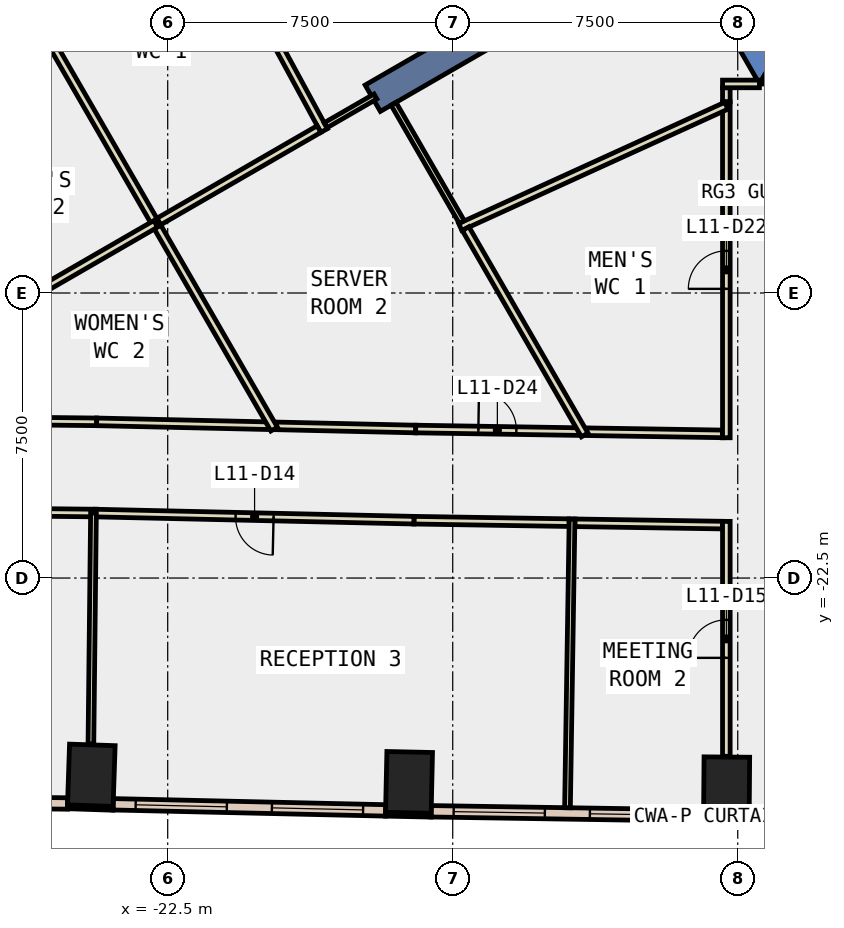
"""IFC4 building model, lengths in metres.
Left out: names, types, materials, properties, quantities, classifications, styles, units other than length and angle.
Written with IfcOpenShell. Run it as: python <this file> out.ifc"""

import sys

from ifc_helpers import new_model, si_unit, direction, frame, frame_2d, origin, origin_2d, place, context, subcontext, project, spatial, polyline, rectangle, outline, extrude, element, fill, save


model = new_model("IFC4")
c1 = context("Model", 3, precision=1e-05, world=origin(), true_north=direction((0.0, 1.0)))
c2 = subcontext(c1, "Body", "Model", "MODEL_VIEW")
j1 = project(units=[si_unit("LENGTHUNIT", "METRE"), si_unit("PLANEANGLEUNIT", "RADIAN")], contexts=[c1])
p1 = place(None, origin())
s1 = spatial("IfcSite", under=j1, at=p1, CompositionType="ELEMENT")
p2 = place(p1, origin())
s2 = spatial("IfcBuilding", under=s1, at=p2, CompositionType="ELEMENT")
p3 = place(p2, frame((0.0, 0.0, 56.0)))
s3 = spatial("IfcBuildingStorey", under=s2, at=p3, CompositionType="ELEMENT", Elevation=56.0)
for number, where, z_axis, x_axis in (
    (1, (-24.51, -27.69, -0.4), (0.0, 0.0, 1.0), (-0.999, 0.034, 0.0)),
    (2, (-16.15, -27.877, -0.4), (0.0, 0.0, 1.0), (-1.0, 0.022, 0.0)),
    (3, (-7.793, -28.01, -0.4), (0.0, 0.0, 1.0), (-1.0, 0.008, 0.0)),
):
    element("IfcColumn", number, at=place(p3, frame(where, z_axis=z_axis, x_axis=x_axis)), inside=s3, PredefinedType="COLUMN", context=c2, shape_type="SweptSolid", body=[
        extrude(rectangle(XDim=1.2, YDim=1.6, at=origin_2d()), origin(), (0.0, 0.0, 1.0), 4.2),
    ])
p4 = place(p3, frame((0.0, 0.0, -0.4)))
e4 = element("IfcWall", 4, at=p4, inside=s3, PredefinedType="SHEAR", context=c2, shape_type="SweptSolid", body=[
    extrude(outline(polyline([(-13.856, 2.5), (-6.928, -9.5), (-6.351, -8.5), (-12.702, 2.5), (-13.856, 2.5)])), origin(), (0.0, 0.0, 1.0), 4.2),
])
p5 = place(p3, frame((0.0, 0.0, -0.4)))
e5 = element("IfcWall", 5, at=p5, inside=s3, PredefinedType="SHEAR", context=c2, shape_type="SweptSolid", body=[
    extrude(outline(polyline([(3.75, -9.5), (3.75, -8.5), (-6.351, -8.5), (-6.928, -9.5), (3.75, -9.5)])), origin(), (0.0, 0.0, 1.0), 4.2),
])
p6 = place(p3, frame((-9.31, -5.375, -0.4), z_axis=(0.0, 0.0, 1.0), x_axis=(-0.866017533419, -0.500013631625, 0.0)))
e6 = element("IfcWall", 6, at=p6, inside=s3, PredefinedType="SHEAR", context=c2, shape_type="SweptSolid", body=[
    extrude(rectangle(XDim=9.0, YDim=0.8, at=frame_2d((4.5, 0.0))), origin(), (0.0, 0.0, 1.0), 4.2),
])
p7 = place(p3, frame((-25.138, -28.519, 0.0), z_axis=(0.0, 0.0, 1.0), x_axis=(0.999442872267, -0.03337581573, 0.0)))
e7 = element("IfcWall", 7, at=p7, inside=s3, PredefinedType="STANDARD", context=c2, shape_type="SweptSolid", body=[
    extrude(rectangle(XDim=1.2, YDim=0.1, at=frame_2d((0.6, 0.0))), origin(), (0.0, 0.0, 1.0), 3.8),
])
p8 = place(p3, frame((-16.769, -28.714, 0.0), z_axis=(0.0, 0.0, 1.0), x_axis=(0.99976752127, -0.021561618973, 0.0)))
e8 = element("IfcWall", 8, at=p8, inside=s3, PredefinedType="STANDARD", context=c2, shape_type="SweptSolid", body=[
    extrude(rectangle(XDim=1.2, YDim=0.1, at=frame_2d((0.6, 0.0))), origin(), (0.0, 0.0, 1.0), 3.8),
])
p9 = place(p3, frame((-8.4, -28.855, 0.0), z_axis=(0.0, 0.0, 1.0), x_axis=(0.999965208912, -0.008341520563, 0.0)))
e9 = element("IfcWall", 9, at=p9, inside=s3, PredefinedType="STANDARD", context=c2, shape_type="SweptSolid", body=[
    extrude(rectangle(XDim=1.2, YDim=0.1, at=frame_2d((0.6, 0.0))), origin(), (0.0, 0.0, 1.0), 3.8),
])
p10 = place(p3, frame((-32.279, -28.353, 0.0), z_axis=(0.0, 0.0, 1.0), x_axis=(0.999939101213, -0.011036025753, 0.0)))
e10 = element("IfcWall", 10, at=p10, inside=s3, PredefinedType="STANDARD", context=c2, shape_type="SweptSolid", body=[
    extrude(rectangle(XDim=7.146, YDim=0.3, at=frame_2d((3.573, 0.0))), origin(), (0.0, 0.0, 1.0), 3.8),
])
p11 = place(p10, frame((0.586, 0.0, 0.9)))
e11 = element("IfcOpeningElement", 11, at=p11, cuts=e10, PredefinedType="OPENING", context=c2, shape_type="SweptSolid", body=[
    extrude(rectangle(XDim=2.4, YDim=2.6, at=frame_2d((1.2, 1.3))), frame((0.0, 0.16, 0.0), z_axis=(0.0, -1.0, 0.0), x_axis=(1.0, 0.0, 0.0)), (0.0, 0.0, 1.0), 0.32),
])
p12 = place(p10, frame((4.159, 0.0, 0.9)))
e12 = element("IfcOpeningElement", 12, at=p12, cuts=e10, PredefinedType="OPENING", context=c2, shape_type="SweptSolid", body=[
    extrude(rectangle(XDim=2.4, YDim=2.6, at=frame_2d((1.2, 1.3))), frame((0.0, 0.16, 0.0), z_axis=(0.0, -1.0, 0.0), x_axis=(1.0, 0.0, 0.0)), (0.0, 0.0, 1.0), 0.32),
])
p13 = place(p3, frame((-23.936, -28.453, 0.0), z_axis=(0.0, 0.0, 1.0), x_axis=(0.999747567852, -0.022467767461, 0.0)))
e13 = element("IfcWall", 13, at=p13, inside=s3, PredefinedType="STANDARD", context=c2, shape_type="SweptSolid", body=[
    extrude(rectangle(XDim=7.172, YDim=0.3, at=frame_2d((3.586, 0.0))), origin(), (0.0, 0.0, 1.0), 3.8),
])
p14 = place(p13, frame((0.593, 0.0, 0.9)))
e14 = element("IfcOpeningElement", 14, at=p14, cuts=e13, PredefinedType="OPENING", context=c2, shape_type="SweptSolid", body=[
    extrude(rectangle(XDim=2.4, YDim=2.6, at=frame_2d((1.2, 1.3))), frame((0.0, 0.16, 0.0), z_axis=(0.0, -1.0, 0.0), x_axis=(1.0, 0.0, 0.0)), (0.0, 0.0, 1.0), 0.32),
])
p15 = place(p13, frame((4.179, 0.0, 0.9)))
e15 = element("IfcOpeningElement", 15, at=p15, cuts=e13, PredefinedType="OPENING", context=c2, shape_type="SweptSolid", body=[
    extrude(rectangle(XDim=2.4, YDim=2.6, at=frame_2d((1.2, 1.3))), frame((0.0, 0.16, 0.0), z_axis=(0.0, -1.0, 0.0), x_axis=(1.0, 0.0, 0.0)), (0.0, 0.0, 1.0), 0.32),
])
p16 = place(p3, frame((-15.568, -28.637, 0.0), z_axis=(0.0, 0.0, 1.0), x_axis=(0.999875756772, -0.015762963512, 0.0)))
e16 = element("IfcWall", 16, at=p16, inside=s3, PredefinedType="STANDARD", context=c2, shape_type="SweptSolid", body=[
    extrude(rectangle(XDim=7.171, YDim=0.3, at=frame_2d((3.585, 0.0))), origin(), (0.0, 0.0, 1.0), 3.8),
])
p17 = place(p16, frame((0.593, 0.0, 0.9)))
e17 = element("IfcOpeningElement", 17, at=p17, cuts=e16, PredefinedType="OPENING", context=c2, shape_type="SweptSolid", body=[
    extrude(rectangle(XDim=2.4, YDim=2.6, at=frame_2d((1.2, 1.3))), frame((0.0, 0.16, 0.0), z_axis=(0.0, -1.0, 0.0), x_axis=(1.0, 0.0, 0.0)), (0.0, 0.0, 1.0), 0.32),
])
p18 = place(p16, frame((4.178, 0.0, 0.9)))
e18 = element("IfcOpeningElement", 18, at=p18, cuts=e16, PredefinedType="OPENING", context=c2, shape_type="SweptSolid", body=[
    extrude(rectangle(XDim=2.4, YDim=2.6, at=frame_2d((1.2, 1.3))), frame((0.0, 0.16, 0.0), z_axis=(0.0, -1.0, 0.0), x_axis=(1.0, 0.0, 0.0)), (0.0, 0.0, 1.0), 0.32),
])
p19 = place(p3, frame((-11.477, -18.65, 0.0), z_axis=(0.0, 0.0, 1.0), x_axis=(0.9998724957, -0.015968479661, 0.0)))
e19 = element("IfcWall", 19, at=p19, inside=s3, PredefinedType="PARTITIONING", context=c2, shape_type="SweptSolid", body=[
    extrude(rectangle(XDim=3.578, YDim=0.2, at=frame_2d((1.789, 0.0))), origin(), (0.0, 0.0, 1.0), 3.8),
])
p20 = place(p3, frame((-19.649, -18.496, 0.0), z_axis=(0.0, 0.0, 1.0), x_axis=(0.999744980574, -0.02258259988, 0.0)))
e20 = element("IfcWall", 20, at=p20, inside=s3, PredefinedType="PARTITIONING", context=c2, shape_type="SweptSolid", body=[
    extrude(rectangle(XDim=3.676, YDim=0.2, at=frame_2d((1.838, 0.0))), origin(), (0.0, 0.0, 1.0), 3.8),
])
p21 = place(p3, frame((-15.974, -18.579, 0.0), z_axis=(0.0, 0.0, 1.0), x_axis=(0.999875289316, -0.015792587377, 0.0)))
e21 = element("IfcWall", 21, at=p21, inside=s3, PredefinedType="PARTITIONING", context=c2, shape_type="SweptSolid", body=[
    extrude(rectangle(XDim=4.298, YDim=0.2, at=frame_2d((2.149, 0.0))), origin(), (0.0, 0.0, 1.0), 3.8),
])
p22 = place(p21, frame((1.649, 0.0, 0.0)))
e22 = element("IfcOpeningElement", 22, at=p22, cuts=e21, PredefinedType="OPENING", context=c2, shape_type="SweptSolid", body=[
    extrude(rectangle(XDim=1.0, YDim=2.1, at=frame_2d((0.5, 1.05))), frame((0.0, 0.11, 0.0), z_axis=(0.0, -1.0, 0.0), x_axis=(1.0, 0.0, 0.0)), (0.0, 0.0, 1.0), 0.22),
])
p23 = place(p3, frame((-31.431, -18.312, 0.0), z_axis=(0.0, 0.0, 1.0), x_axis=(0.999939195602, -0.011027470214, 0.0)))
e23 = element("IfcWall", 23, at=p23, inside=s3, PredefinedType="PARTITIONING", context=c2, shape_type="SweptSolid", body=[
    extrude(rectangle(XDim=7.062, YDim=0.2, at=frame_2d((3.531, 0.0))), origin(), (0.0, 0.0, 1.0), 3.8),
])
p24 = place(p23, frame((3.031, 0.0, 0.0)))
e24 = element("IfcOpeningElement", 24, at=p24, cuts=e23, PredefinedType="OPENING", context=c2, shape_type="SweptSolid", body=[
    extrude(rectangle(XDim=1.0, YDim=2.1, at=frame_2d((0.5, 1.05))), frame((0.0, 0.11, 0.0), z_axis=(0.0, -1.0, 0.0), x_axis=(1.0, 0.0, 0.0)), (0.0, 0.0, 1.0), 0.22),
])
p25 = place(p3, frame((-24.369, -18.39, 0.0), z_axis=(0.0, 0.0, 1.0), x_axis=(0.99974519793, -0.022572975354, 0.0)))
e25 = element("IfcWall", 25, at=p25, inside=s3, PredefinedType="PARTITIONING", context=c2, shape_type="SweptSolid", body=[
    extrude(rectangle(XDim=4.521, YDim=0.2, at=frame_2d((2.26, 0.0))), origin(), (0.0, 0.0, 1.0), 3.8),
])
p26 = place(p3, frame((-24.378, -20.79, 0.0), z_axis=(0.0, 0.0, 1.0), x_axis=(-0.99993897746, 0.011047232974, 0.0)))
e26 = element("IfcWall", 26, at=p26, inside=s3, PredefinedType="PARTITIONING", context=c2, shape_type="SweptSolid", body=[
    extrude(rectangle(XDim=7.426, YDim=0.2, at=frame_2d((3.713, 0.0))), origin(), (0.0, 0.0, 1.0), 3.8),
])
p27 = place(p3, frame((-11.936, -21.043, 0.0), z_axis=(0.0, 0.0, 1.0), x_axis=(-0.999873595398, 0.015899472524, 0.0)))
e27 = element("IfcWall", 27, at=p27, inside=s3, PredefinedType="PARTITIONING", context=c2, shape_type="SweptSolid", body=[
    extrude(rectangle(XDim=4.084, YDim=0.2, at=frame_2d((2.042, 0.0))), origin(), (0.0, 0.0, 1.0), 3.8),
])
p28 = place(p3, frame((-16.02, -20.978, 0.0), z_axis=(0.0, 0.0, 1.0), x_axis=(-0.999749010047, 0.02240350216, 0.0)))
e28 = element("IfcWall", 28, at=p28, inside=s3, PredefinedType="PARTITIONING", context=c2, shape_type="SweptSolid", body=[
    extrude(rectangle(XDim=8.391, YDim=0.2, at=frame_2d((4.196, 0.0))), origin(), (0.0, 0.0, 1.0), 3.8),
])
p29 = place(p28, frame((3.695, 0.0, 0.0)))
e29 = element("IfcOpeningElement", 29, at=p29, cuts=e28, PredefinedType="OPENING", context=c2, shape_type="SweptSolid", body=[
    extrude(rectangle(XDim=1.0, YDim=2.1, at=frame_2d((0.5, 1.05))), frame((0.0, 0.11, 0.0), z_axis=(0.0, -1.0, 0.0), x_axis=(1.0, 0.0, 0.0)), (0.0, 0.0, 1.0), 0.22),
])
p30 = place(p3, frame((-7.9, -21.107, 0.0), z_axis=(0.0, 0.0, 1.0), x_axis=(-0.999876676102, 0.015704540367, 0.0)))
e30 = element("IfcWall", 30, at=p30, inside=s3, PredefinedType="PARTITIONING", context=c2, shape_type="SweptSolid", body=[
    extrude(rectangle(XDim=3.886, YDim=0.2, at=frame_2d((1.943, 0.0))), origin(), (0.0, 0.0, 1.0), 3.8),
])
p31 = place(p3, frame((-7.8, -9.972, 0.0), z_axis=(0.0, 0.0, 1.0), x_axis=(0.0, 1.0, 0.0)))
e31 = element("IfcWall", 31, at=p31, inside=s3, PredefinedType="PARTITIONING", context=c2, shape_type="SweptSolid", body=[
    extrude(rectangle(XDim=0.373, YDim=0.2, at=frame_2d((0.187, 0.0))), origin(), (0.0, 0.0, 1.0), 3.8),
])
p32 = place(p3, frame((-7.9, -9.499, 0.0), z_axis=(0.0, 0.0, 1.0), x_axis=(1.0, 0.0, 0.0)))
e32 = element("IfcWall", 32, at=p32, inside=s3, PredefinedType="PARTITIONING", context=c2, shape_type="SweptSolid", body=[
    extrude(rectangle(XDim=0.971, YDim=0.2, at=frame_2d((0.485, 0.0))), origin(), (0.0, 0.0, 1.0), 3.8),
])
p33 = place(p3, frame((-7.8, -18.809, 0.0), z_axis=(0.0, 0.0, 1.0), x_axis=(0.0, 1.0, 0.0)))
e33 = element("IfcWall", 33, at=p33, inside=s3, PredefinedType="PARTITIONING", context=c2, shape_type="SweptSolid", body=[
    extrude(rectangle(XDim=8.837, YDim=0.2, at=frame_2d((4.418, 0.0))), origin(), (0.0, 0.0, 1.0), 3.8),
])
p34 = place(p33, frame((3.918, 0.0, 0.0)))
e34 = element("IfcOpeningElement", 34, at=p34, cuts=e33, PredefinedType="OPENING", context=c2, shape_type="SweptSolid", body=[
    extrude(rectangle(XDim=1.0, YDim=2.1, at=frame_2d((0.5, 1.05))), frame((0.0, 0.11, 0.0), z_axis=(0.0, -1.0, 0.0), x_axis=(1.0, 0.0, 0.0)), (0.0, 0.0, 1.0), 0.22),
])
p35 = place(p3, frame((-7.8, -27.19, 0.0), z_axis=(0.0, 0.0, 1.0), x_axis=(0.0, 1.0, 0.0)))
e35 = element("IfcWall", 35, at=p35, inside=s3, PredefinedType="PARTITIONING", context=c2, shape_type="SweptSolid", body=[
    extrude(rectangle(XDim=6.181, YDim=0.2, at=frame_2d((3.09, 0.0))), origin(), (0.0, 0.0, 1.0), 3.8),
])
p36 = place(p35, frame((2.59, 0.0, 0.0)))
e36 = element("IfcOpeningElement", 36, at=p36, cuts=e35, PredefinedType="OPENING", context=c2, shape_type="SweptSolid", body=[
    extrude(rectangle(XDim=1.0, YDim=2.1, at=frame_2d((0.5, 1.05))), frame((0.0, 0.11, 0.0), z_axis=(0.0, -1.0, 0.0), x_axis=(1.0, 0.0, 0.0)), (0.0, 0.0, 1.0), 0.22),
])
p37 = place(p3, frame((-7.8, -10.072, 0.0), z_axis=(0.0, 0.0, 1.0), x_axis=(-0.910011899741, -0.414582129777, 0.0)))
e37 = element("IfcWall", 37, at=p37, inside=s3, PredefinedType="PARTITIONING", context=c2, shape_type="SweptSolid", body=[
    extrude(rectangle(XDim=7.694, YDim=0.2, at=frame_2d((3.847, 0.0))), origin(), (0.0, 0.0, 1.0), 3.8),
])
p38 = place(p3, frame((-18.384, -10.725, 0.0), z_axis=(0.0, 0.0, 1.0), x_axis=(-0.477137547132, 0.878828630119, 0.0)))
e38 = element("IfcWall", 38, at=p38, inside=s3, PredefinedType="PARTITIONING", context=c2, shape_type="SweptSolid", body=[
    extrude(rectangle(XDim=9.552, YDim=0.2, at=frame_2d((4.776, 0.0))), origin(), (0.0, 0.0, 1.0), 3.8),
])
p39 = place(p3, frame((-14.761, -13.134, 0.0), z_axis=(0.0, 0.0, 1.0), x_axis=(-0.499704810774, 0.866195764299, 0.0)))
e39 = element("IfcWall", 39, at=p39, inside=s3, PredefinedType="PARTITIONING", context=c2, shape_type="SweptSolid", body=[
    extrude(rectangle(XDim=3.594, YDim=0.15, at=frame_2d((1.797, 0.0))), origin(), (0.0, 0.0, 1.0), 3.8),
])
p40 = place(p3, frame((-17.033, -9.829, 0.0), z_axis=(0.0, 0.0, 1.0), x_axis=(-0.866094414679, -0.49988045057, 0.0)))
e40 = element("IfcWall", 40, at=p40, inside=s3, PredefinedType="PARTITIONING", context=c2, shape_type="SweptSolid", body=[
    extrude(rectangle(XDim=1.516, YDim=0.15, at=frame_2d((0.758, 0.0))), origin(), (0.0, 0.0, 1.0), 3.8),
])
p41 = place(p3, frame((-11.527, -18.735, 0.0), z_axis=(0.0, 0.0, 1.0), x_axis=(-0.499976457224, 0.866038995786, 0.0)))
e41 = element("IfcWall", 41, at=p41, inside=s3, PredefinedType="PARTITIONING", context=c2, shape_type="SweptSolid", body=[
    extrude(rectangle(XDim=6.268, YDim=0.2, at=frame_2d((3.134, 0.0))), origin(), (0.0, 0.0, 1.0), 3.8),
])
p42 = place(p3, frame((-18.519, -10.687, 0.0), z_axis=(0.0, 0.0, 1.0), x_axis=(-0.866063668779, -0.499933717229, 0.0)))
e42 = element("IfcWall", 42, at=p42, inside=s3, PredefinedType="PARTITIONING", context=c2, shape_type="SweptSolid", body=[
    extrude(rectangle(XDim=4.969, YDim=0.2, at=frame_2d((2.484, 0.0))), origin(), (0.0, 0.0, 1.0), 3.8),
])
p43 = place(p3, frame((-22.822, -13.171, 0.0), z_axis=(0.0, 0.0, 1.0), x_axis=(-0.499974913987, 0.866039886717, 0.0)))
e43 = element("IfcWall", 43, at=p43, inside=s3, PredefinedType="PARTITIONING", context=c2, shape_type="SweptSolid", body=[
    extrude(rectangle(XDim=6.222, YDim=0.2, at=frame_2d((3.111, 0.0))), origin(), (0.0, 0.0, 1.0), 3.8),
])
p44 = place(p3, frame((-19.699, -18.581, 0.0), z_axis=(0.0, 0.0, 1.0), x_axis=(-0.499899838407, 0.866083224385, 0.0)))
e44 = element("IfcWall", 44, at=p44, inside=s3, PredefinedType="PARTITIONING", context=c2, shape_type="SweptSolid", body=[
    extrude(rectangle(XDim=6.235, YDim=0.2, at=frame_2d((3.118, 0.0))), origin(), (0.0, 0.0, 1.0), 3.8),
])
p45 = place(p3, frame((-22.816, -13.181, 0.0), z_axis=(0.0, 0.0, 1.0), x_axis=(-0.86601529143, -0.500017514703, 0.0)))
e45 = element("IfcWall", 45, at=p45, inside=s3, PredefinedType="PARTITIONING", context=c2, shape_type="SweptSolid", body=[
    extrude(rectangle(XDim=9.932, YDim=0.2, at=frame_2d((4.966, 0.0))), origin(), (0.0, 0.0, 1.0), 3.8),
])
p46 = place(p3, frame((-24.453, -20.79, 0.0), z_axis=(0.0, 0.0, 1.0), x_axis=(-0.011204565898, -0.999937226881, 0.0)))
e46 = element("IfcWall", 46, at=p46, inside=s3, PredefinedType="PARTITIONING", context=c2, shape_type="SweptSolid", body=[
    extrude(rectangle(XDim=6.079, YDim=0.15, at=frame_2d((3.04, 0.0))), origin(), (0.0, 0.0, 1.0), 3.8),
])
p47 = place(p3, frame((-11.86, -20.945, 0.0), z_axis=(0.0, 0.0, 1.0), x_axis=(-0.015773137921, -0.999875596322, 0.0)))
e47 = element("IfcWall", 47, at=p47, inside=s3, PredefinedType="PARTITIONING", context=c2, shape_type="SweptSolid", body=[
    extrude(rectangle(XDim=7.6, YDim=0.15, at=frame_2d((3.8, 0.0))), origin(), (0.0, 0.0, 1.0), 3.8),
])
p48 = place(p14, origin())
e48 = element("IfcWindow", 48, at=p48, inside=s3, PartitioningType="SINGLE_PANEL", PredefinedType="WINDOW", context=c2, shape_type="SweptSolid", body=[
    extrude(rectangle(XDim=2.4, YDim=2.6, at=frame_2d((1.2, 1.3))), frame((0.0, 0.03, 0.0), z_axis=(0.0, -1.0, 0.0), x_axis=(1.0, 0.0, 0.0)), (0.0, 0.0, 1.0), 0.06),
])
fill(e14, e48)
p49 = place(p15, origin())
e49 = element("IfcWindow", 49, at=p49, inside=s3, PartitioningType="SINGLE_PANEL", PredefinedType="WINDOW", context=c2, shape_type="SweptSolid", body=[
    extrude(rectangle(XDim=2.4, YDim=2.6, at=frame_2d((1.2, 1.3))), frame((0.0, 0.03, 0.0), z_axis=(0.0, -1.0, 0.0), x_axis=(1.0, 0.0, 0.0)), (0.0, 0.0, 1.0), 0.06),
])
fill(e15, e49)
p50 = place(p17, origin())
e50 = element("IfcWindow", 50, at=p50, inside=s3, PartitioningType="SINGLE_PANEL", PredefinedType="WINDOW", context=c2, shape_type="SweptSolid", body=[
    extrude(rectangle(XDim=2.4, YDim=2.6, at=frame_2d((1.2, 1.3))), frame((0.0, 0.03, 0.0), z_axis=(0.0, -1.0, 0.0), x_axis=(1.0, 0.0, 0.0)), (0.0, 0.0, 1.0), 0.06),
])
fill(e17, e50)
p51 = place(p18, origin())
e51 = element("IfcWindow", 51, at=p51, inside=s3, PartitioningType="SINGLE_PANEL", PredefinedType="WINDOW", context=c2, shape_type="SweptSolid", body=[
    extrude(rectangle(XDim=2.4, YDim=2.6, at=frame_2d((1.2, 1.3))), frame((0.0, 0.03, 0.0), z_axis=(0.0, -1.0, 0.0), x_axis=(1.0, 0.0, 0.0)), (0.0, 0.0, 1.0), 0.06),
])
fill(e18, e51)
p52 = place(p29, origin())
e52 = element("IfcDoor", 52, at=p52, inside=s3, OperationType="SINGLE_SWING_RIGHT", PredefinedType="DOOR", context=c2, shape_type="SweptSolid", body=[
    extrude(rectangle(XDim=1.0, YDim=2.1, at=frame_2d((0.5, 1.05))), frame((0.0, 0.025, 0.0), z_axis=(0.0, -1.0, 0.0), x_axis=(1.0, 0.0, 0.0)), (0.0, 0.0, 1.0), 0.05),
])
fill(e29, e52)
p53 = place(p36, origin())
e53 = element("IfcDoor", 53, at=p53, inside=s3, OperationType="SINGLE_SWING_LEFT", PredefinedType="DOOR", context=c2, shape_type="SweptSolid", body=[
    extrude(rectangle(XDim=1.0, YDim=2.1, at=frame_2d((0.5, 1.05))), frame((0.0, 0.025, 0.0), z_axis=(0.0, -1.0, 0.0), x_axis=(1.0, 0.0, 0.0)), (0.0, 0.0, 1.0), 0.05),
])
fill(e36, e53)
p54 = place(p34, origin())
e54 = element("IfcDoor", 54, at=p54, inside=s3, OperationType="SINGLE_SWING_RIGHT", PredefinedType="DOOR", context=c2, shape_type="SweptSolid", body=[
    extrude(rectangle(XDim=1.0, YDim=2.1, at=frame_2d((0.5, 1.05))), frame((0.0, 0.025, 0.0), z_axis=(0.0, -1.0, 0.0), x_axis=(1.0, 0.0, 0.0)), (0.0, 0.0, 1.0), 0.05),
])
fill(e34, e54)
p55 = place(p22, origin())
e55 = element("IfcDoor", 55, at=p55, inside=s3, OperationType="SINGLE_SWING_LEFT", PredefinedType="DOOR", context=c2, shape_type="SweptSolid", body=[
    extrude(rectangle(XDim=1.0, YDim=2.1, at=frame_2d((0.5, 1.05))), frame((0.0, 0.025, 0.0), z_axis=(0.0, -1.0, 0.0), x_axis=(1.0, 0.0, 0.0)), (0.0, 0.0, 1.0), 0.05),
])
fill(e22, e55)
save(model, sys.argv[1])
